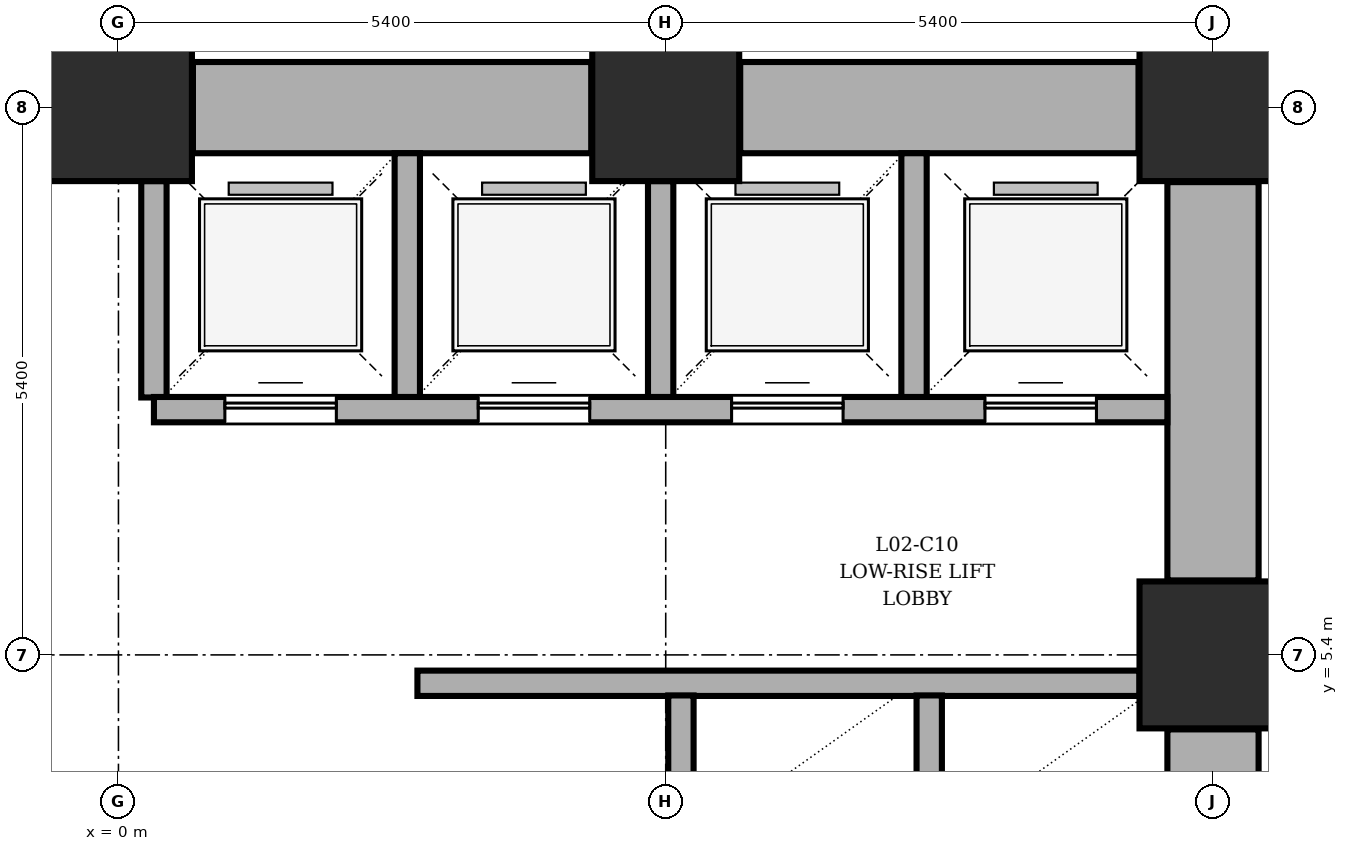
"""IFC4 building model, lengths in metres.
Left out: names, types, materials, properties, quantities, classifications, styles, units other than length and angle.
Written with IfcOpenShell. Run it as: python <this file> out.ifc"""

import sys

from ifc_helpers import new_model, si_unit, direction, frame, frame_2d, origin, origin_2d, place, context, subcontext, project, spatial, rectangle, extrude, element, fill, save


model = new_model("IFC4")
c1 = context("Model", 3, precision=1e-05, world=origin(), true_north=direction((0.0, 1.0)))
c2 = subcontext(c1, "Body", "Model", "MODEL_VIEW")
j1 = project(units=[si_unit("LENGTHUNIT", "METRE"), si_unit("PLANEANGLEUNIT", "RADIAN")], contexts=[c1])
p1 = place(None, origin())
s1 = spatial("IfcSite", under=j1, at=p1, CompositionType="ELEMENT")
p2 = place(p1, origin())
s2 = spatial("IfcBuilding", under=s1, at=p2, CompositionType="ELEMENT")
p3 = place(p2, frame((0.0, 0.0, 9.0)))
s3 = spatial("IfcBuildingStorey", under=s2, at=p3, CompositionType="ELEMENT", Elevation=9.0)
for number, where, z_axis, x_axis in (
    (1, (0.0, 10.8, 0.0), (0.0, 0.0, 1.0), (1.0, 0.0, 0.0)),
    (2, (5.4, 10.8, 0.0), (0.0, 0.0, 1.0), (1.0, 0.0, 0.0)),
    (3, (10.8, 5.4, 0.0), (0.0, 0.0, 1.0), (1.0, 0.0, 0.0)),
    (4, (10.8, 10.8, 0.0), (0.0, 0.0, 1.0), (1.0, 0.0, 0.0)),
):
    element("IfcColumn", number, at=place(p3, frame(where, z_axis=z_axis, x_axis=x_axis)), inside=s3, PredefinedType="COLUMN", context=c2, shape_type="SweptSolid", body=[
        extrude(rectangle(XDim=1.45, YDim=1.45, at=origin_2d()), origin(), (0.0, 0.0, 1.0), 4.5),
    ])
p4 = place(p3, frame((0.735, 10.8, 0.0), z_axis=(0.0, 0.0, 1.0), x_axis=(1.0, 0.0, 0.0)))
e5 = element("IfcWall", 5, at=p4, inside=s3, PredefinedType="SHEAR", context=c2, shape_type="SweptSolid", body=[
    extrude(rectangle(XDim=3.93, YDim=0.9, at=frame_2d((1.965, 0.0))), origin(), (0.0, 0.0, 1.0), 4.5),
])
p5 = place(p3, frame((10.8, 0.735, 0.0), z_axis=(0.0, 0.0, 1.0), x_axis=(0.0, 1.0, 0.0)))
e6 = element("IfcWall", 6, at=p5, inside=s3, PredefinedType="SHEAR", context=c2, shape_type="SweptSolid", body=[
    extrude(rectangle(XDim=3.93, YDim=0.9, at=frame_2d((1.965, 0.0))), origin(), (0.0, 0.0, 1.0), 4.5),
])
p6 = place(p5, frame((1.415, 0.0, 0.0)))
e7 = element("IfcOpeningElement", 7, at=p6, cuts=e6, PredefinedType="OPENING", context=c2, shape_type="SweptSolid", body=[
    extrude(rectangle(XDim=1.1, YDim=2.1, at=frame_2d((0.55, 1.05))), frame((0.0, 0.46, 0.0), z_axis=(0.0, -1.0, 0.0), x_axis=(1.0, 0.0, 0.0)), (0.0, 0.0, 1.0), 0.92),
])
for number, where, z_axis, x_axis in (
    (8, (6.135, 10.8, 0.0), (0.0, 0.0, 1.0), (1.0, 0.0, 0.0)),
    (9, (10.8, 6.135, 0.0), (0.0, 0.0, 1.0), (0.0, 1.0, 0.0)),
):
    element("IfcWall", number, at=place(p3, frame(where, z_axis=z_axis, x_axis=x_axis)), inside=s3, PredefinedType="SHEAR", context=c2, shape_type="SweptSolid", body=[
        extrude(rectangle(XDim=3.93, YDim=0.9, at=frame_2d((1.965, 0.0))), origin(), (0.0, 0.0, 1.0), 4.5),
    ])
p7 = place(p3, frame((2.85, 7.94, 0.0), z_axis=(0.0, 0.0, 1.0), x_axis=(0.0, 1.0, 0.0)))
e10 = element("IfcWall", 10, at=p7, inside=s3, PredefinedType="SHEAR", context=c2, shape_type="SweptSolid", body=[
    extrude(rectangle(XDim=2.41, YDim=0.25, at=frame_2d((1.205, 0.0))), origin(), (0.0, 0.0, 1.0), 4.5),
])
for number, where, z_axis, x_axis in (
    (11, (0.35, 7.94, 0.0), (0.0, 0.0, 1.0), (0.0, 1.0, 0.0)),
    (12, (5.35, 7.94, 0.0), (0.0, 0.0, 1.0), (0.0, 1.0, 0.0)),
):
    element("IfcWall", number, at=place(p3, frame(where, z_axis=z_axis, x_axis=x_axis)), inside=s3, PredefinedType="SHEAR", context=c2, shape_type="SweptSolid", body=[
        extrude(rectangle(XDim=2.135, YDim=0.25, at=frame_2d((1.067, 0.0))), origin(), (0.0, 0.0, 1.0), 4.5),
    ])
p8 = place(p3, frame((7.85, 7.94, 0.0), z_axis=(0.0, 0.0, 1.0), x_axis=(0.0, 1.0, 0.0)))
e13 = element("IfcWall", 13, at=p8, inside=s3, PredefinedType="SHEAR", context=c2, shape_type="SweptSolid", body=[
    extrude(rectangle(XDim=2.41, YDim=0.25, at=frame_2d((1.205, 0.0))), origin(), (0.0, 0.0, 1.0), 4.5),
])
p9 = place(p3, frame((0.35, 7.82, 0.0), z_axis=(0.0, 0.0, 1.0), x_axis=(1.0, 0.0, 0.0)))
e14 = element("IfcWall", 14, at=p9, inside=s3, PredefinedType="SHEAR", context=c2, shape_type="SweptSolid", body=[
    extrude(rectangle(XDim=10.0, YDim=0.25, at=frame_2d((5.0, 0.0))), origin(), (0.0, 0.0, 1.0), 4.5),
])
p10 = place(p9, frame((0.7, 0.0, 0.0)))
e15 = element("IfcOpeningElement", 15, at=p10, cuts=e14, PredefinedType="OPENING", context=c2, shape_type="SweptSolid", body=[
    extrude(rectangle(XDim=1.1, YDim=2.1, at=frame_2d((0.55, 1.05))), frame((0.0, 0.135, 0.0), z_axis=(0.0, -1.0, 0.0), x_axis=(1.0, 0.0, 0.0)), (0.0, 0.0, 1.0), 0.27),
])
p11 = place(p9, frame((3.2, 0.0, 0.0)))
e16 = element("IfcOpeningElement", 16, at=p11, cuts=e14, PredefinedType="OPENING", context=c2, shape_type="SweptSolid", body=[
    extrude(rectangle(XDim=1.1, YDim=2.1, at=frame_2d((0.55, 1.05))), frame((0.0, 0.135, 0.0), z_axis=(0.0, -1.0, 0.0), x_axis=(1.0, 0.0, 0.0)), (0.0, 0.0, 1.0), 0.27),
])
p12 = place(p9, frame((5.7, 0.0, 0.0)))
e17 = element("IfcOpeningElement", 17, at=p12, cuts=e14, PredefinedType="OPENING", context=c2, shape_type="SweptSolid", body=[
    extrude(rectangle(XDim=1.1, YDim=2.1, at=frame_2d((0.55, 1.05))), frame((0.0, 0.135, 0.0), z_axis=(0.0, -1.0, 0.0), x_axis=(1.0, 0.0, 0.0)), (0.0, 0.0, 1.0), 0.27),
])
p13 = place(p9, frame((8.2, 0.0, 0.0)))
e18 = element("IfcOpeningElement", 18, at=p13, cuts=e14, PredefinedType="OPENING", context=c2, shape_type="SweptSolid", body=[
    extrude(rectangle(XDim=1.1, YDim=2.1, at=frame_2d((0.55, 1.05))), frame((0.0, 0.135, 0.0), z_axis=(0.0, -1.0, 0.0), x_axis=(1.0, 0.0, 0.0)), (0.0, 0.0, 1.0), 0.27),
])
p14 = place(p3, frame((2.95, 5.12, 0.0), z_axis=(0.0, 0.0, 1.0), x_axis=(1.0, 0.0, 0.0)))
e19 = element("IfcWall", 19, at=p14, inside=s3, PredefinedType="SHEAR", context=c2, shape_type="SweptSolid", body=[
    extrude(rectangle(XDim=7.125, YDim=0.25, at=frame_2d((3.562, 0.0))), origin(), (0.0, 0.0, 1.0), 4.5),
])
for number, where, z_axis, x_axis in (
    (20, (5.55, 3.55, 0.0), (0.0, 0.0, 1.0), (0.0, 1.0, 0.0)),
    (21, (8.0, 3.55, 0.0), (0.0, 0.0, 1.0), (0.0, 1.0, 0.0)),
):
    element("IfcWall", number, at=place(p3, frame(where, z_axis=z_axis, x_axis=x_axis)), inside=s3, PredefinedType="SHEAR", context=c2, shape_type="SweptSolid", body=[
        extrude(rectangle(XDim=1.45, YDim=0.25, at=frame_2d((0.725, 0.0))), origin(), (0.0, 0.0, 1.0), 4.5),
    ])
p15 = place(p10, origin())
e22 = element("IfcDoor", 22, at=p15, inside=s3, OperationType="SLIDING_TO_LEFT", PredefinedType="DOOR", context=c2, shape_type="SweptSolid", body=[
    extrude(rectangle(XDim=1.1, YDim=2.1, at=frame_2d((0.55, 1.05))), frame((0.0, 0.025, 0.0), z_axis=(0.0, -1.0, 0.0), x_axis=(1.0, 0.0, 0.0)), (0.0, 0.0, 1.0), 0.05),
])
fill(e15, e22)
p16 = place(p11, origin())
e23 = element("IfcDoor", 23, at=p16, inside=s3, OperationType="SLIDING_TO_LEFT", PredefinedType="DOOR", context=c2, shape_type="SweptSolid", body=[
    extrude(rectangle(XDim=1.1, YDim=2.1, at=frame_2d((0.55, 1.05))), frame((0.0, 0.025, 0.0), z_axis=(0.0, -1.0, 0.0), x_axis=(1.0, 0.0, 0.0)), (0.0, 0.0, 1.0), 0.05),
])
fill(e16, e23)
p17 = place(p12, origin())
e24 = element("IfcDoor", 24, at=p17, inside=s3, OperationType="SLIDING_TO_LEFT", PredefinedType="DOOR", context=c2, shape_type="SweptSolid", body=[
    extrude(rectangle(XDim=1.1, YDim=2.1, at=frame_2d((0.55, 1.05))), frame((0.0, 0.025, 0.0), z_axis=(0.0, -1.0, 0.0), x_axis=(1.0, 0.0, 0.0)), (0.0, 0.0, 1.0), 0.05),
])
fill(e17, e24)
p18 = place(p13, origin())
e25 = element("IfcDoor", 25, at=p18, inside=s3, OperationType="SLIDING_TO_LEFT", PredefinedType="DOOR", context=c2, shape_type="SweptSolid", body=[
    extrude(rectangle(XDim=1.1, YDim=2.1, at=frame_2d((0.55, 1.05))), frame((0.0, 0.025, 0.0), z_axis=(0.0, -1.0, 0.0), x_axis=(1.0, 0.0, 0.0)), (0.0, 0.0, 1.0), 0.05),
])
fill(e18, e25)
save(model, sys.argv[1])
